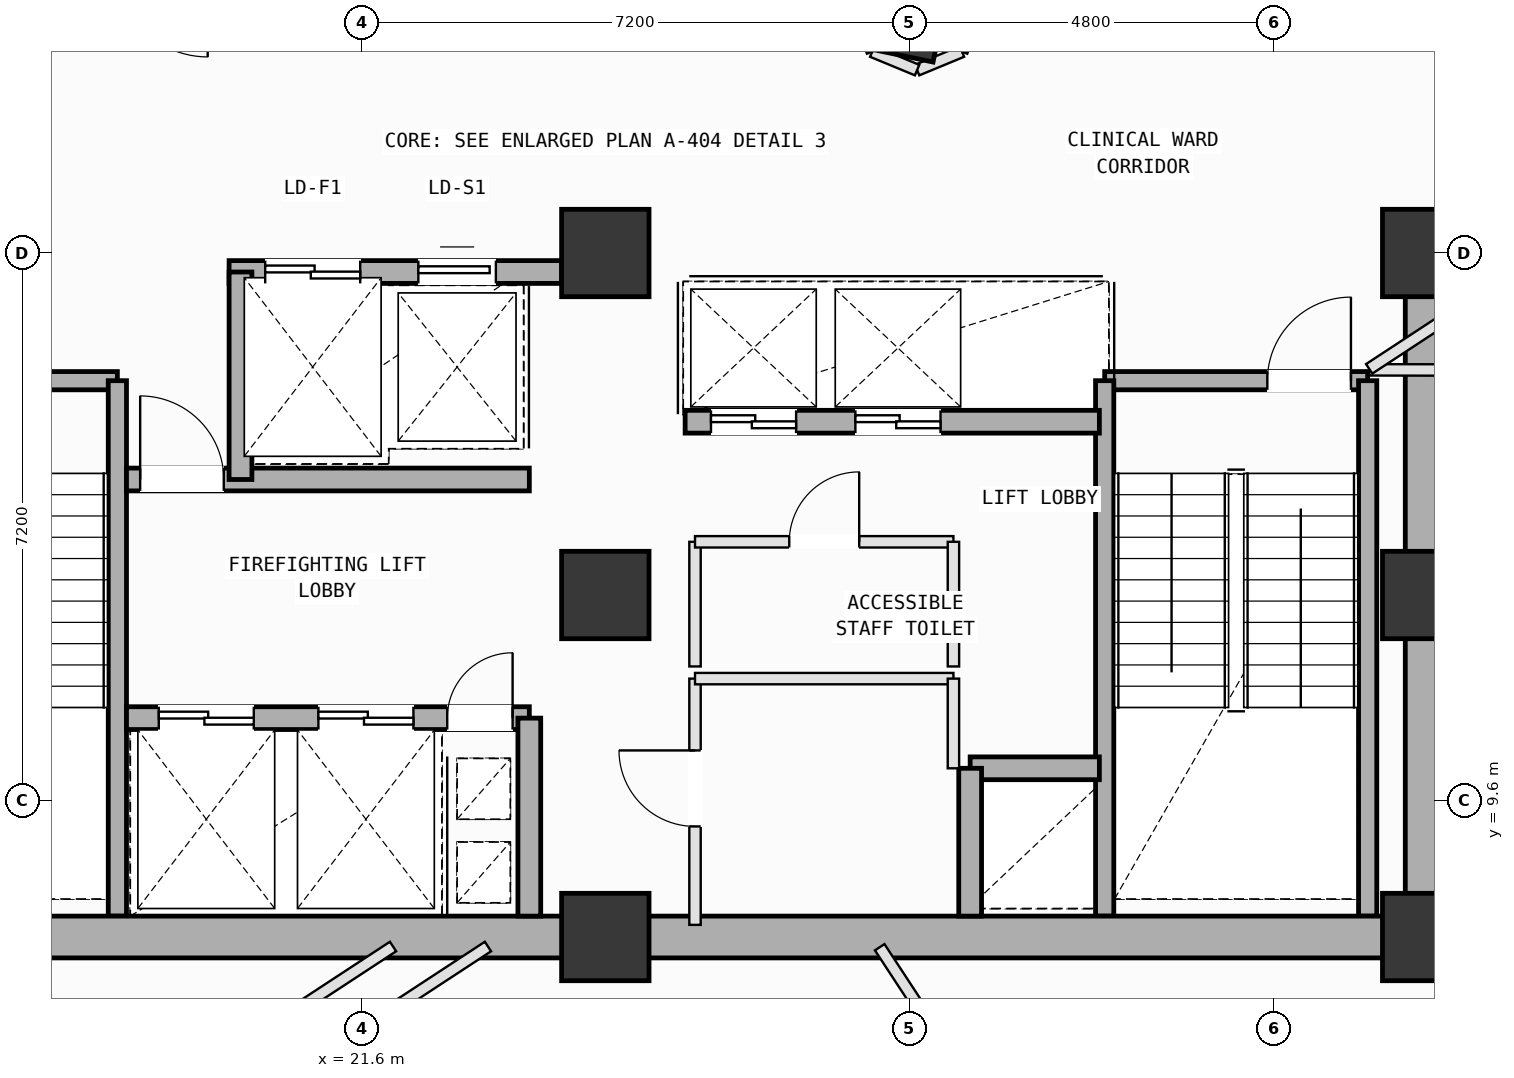
"""IFC4 building model, lengths in metres.
Left out: names, types, materials, properties, quantities, classifications, styles, units other than length and angle.
Written with IfcOpenShell. Run it as: python <this file> out.ifc"""

import sys

from ifc_helpers import new_model, si_unit, direction, frame, frame_2d, origin, origin_2d, place, context, subcontext, project, spatial, rectangle, extrude, element, fill, save


model = new_model("IFC4")
c1 = context("Model", 3, precision=1e-05, world=origin(), true_north=direction((0.0, 1.0)))
c2 = subcontext(c1, "Body", "Model", "MODEL_VIEW")
j1 = project(units=[si_unit("LENGTHUNIT", "METRE"), si_unit("PLANEANGLEUNIT", "RADIAN")], contexts=[c1])
p1 = place(None, origin())
s1 = spatial("IfcSite", under=j1, at=p1, CompositionType="ELEMENT")
p2 = place(p1, origin())
s2 = spatial("IfcBuilding", under=s1, at=p2, CompositionType="ELEMENT")
p3 = place(p2, frame((0.0, 0.0, 165.8)))
s3 = spatial("IfcBuildingStorey", under=s2, at=p3, CompositionType="ELEMENT", Elevation=165.8)
for number, where, z_axis, x_axis in (
    (1, (24.8, 7.8, 0.0), (0.0, 0.0, 1.0), (1.0, 0.0, 0.0)),
    (2, (24.8, 12.3, 0.0), (0.0, 0.0, 1.0), (1.0, 0.0, 0.0)),
    (3, (24.8, 16.8, 0.0), (0.0, 0.0, 1.0), (1.0, 0.0, 0.0)),
    (4, (35.6, 7.8, 0.0), (0.0, 0.0, 1.0), (1.0, 0.0, 0.0)),
    (5, (35.6, 12.3, 0.0), (0.0, 0.0, 1.0), (1.0, 0.0, 0.0)),
    (6, (35.6, 16.8, 0.0), (0.0, 0.0, 1.0), (1.0, 0.0, 0.0)),
):
    element("IfcColumn", number, at=place(p3, frame(where, z_axis=z_axis, x_axis=x_axis)), inside=s3, PredefinedType="COLUMN", context=c2, shape_type="SweptSolid", body=[
        extrude(rectangle(XDim=1.15, YDim=1.15, at=origin_2d()), origin(), (0.0, 0.0, 1.0), 4.0),
    ])
p4 = place(p3, frame((28.863, 20.08, 0.002), z_axis=(0.019724836791, -0.019480566367, 0.99961564531), x_axis=(-0.553225254665, 0.832589411518, 0.027142023308)))
e7 = element("IfcColumn", 7, at=p4, inside=s3, PredefinedType="COLUMN", context=c2, shape_type="SweptSolid", body=[
    extrude(rectangle(XDim=1.4, YDim=0.8, at=origin_2d()), origin(), (0.0, 0.0, 1.0), 3.998),
])
p5 = place(p3, frame((14.92, 15.12, 0.0), z_axis=(0.0, 0.0, 1.0), x_axis=(1.0, 0.0, 0.0)))
e8 = element("IfcWall", 8, at=p5, inside=s3, PredefinedType="SOLIDWALL", context=c2, shape_type="SweptSolid", body=[
    extrude(rectangle(XDim=3.46, YDim=0.24, at=frame_2d((1.73, 0.0))), origin(), (0.0, 0.0, 1.0), 3.78),
])
p6 = place(p5, frame((0.22, 0.0, 0.0)))
e9 = element("IfcOpeningElement", 9, at=p6, cuts=e8, PredefinedType="OPENING", context=c2, shape_type="SweptSolid", body=[
    extrude(rectangle(XDim=1.1, YDim=2.15, at=frame_2d((0.55, 1.075))), frame((0.0, 0.13, 0.0), z_axis=(0.0, -1.0, 0.0), x_axis=(1.0, 0.0, 0.0)), (0.0, 0.0, 1.0), 0.26),
])
p7 = place(p3, frame((18.38, 15.12, 0.0), z_axis=(0.0, 0.0, 1.0), x_axis=(0.0, -1.0, 0.0)))
e10 = element("IfcWall", 10, at=p7, inside=s3, PredefinedType="SOLIDWALL", context=c2, shape_type="SweptSolid", body=[
    extrude(rectangle(XDim=7.045, YDim=0.24, at=frame_2d((3.522, 0.0))), origin(), (0.0, 0.0, 1.0), 3.78),
])
p8 = place(p3, frame((31.37, 15.12, 0.0), z_axis=(0.0, 0.0, 1.0), x_axis=(1.0, 0.0, 0.0)))
e11 = element("IfcWall", 11, at=p8, inside=s3, PredefinedType="SOLIDWALL", context=c2, shape_type="SweptSolid", body=[
    extrude(rectangle(XDim=3.46, YDim=0.24, at=frame_2d((1.73, 0.0))), origin(), (0.0, 0.0, 1.0), 3.78),
])
p9 = place(p8, frame((2.14, 0.0, 0.0)))
e12 = element("IfcOpeningElement", 12, at=p9, cuts=e11, PredefinedType="OPENING", context=c2, shape_type="SweptSolid", body=[
    extrude(rectangle(XDim=1.1, YDim=2.15, at=frame_2d((0.55, 1.075))), frame((0.0, 0.13, 0.0), z_axis=(0.0, -1.0, 0.0), x_axis=(1.0, 0.0, 0.0)), (0.0, 0.0, 1.0), 0.26),
])
for number, where, z_axis, x_axis in (
    (13, (34.83, 15.12, 0.0), (0.0, 0.0, 1.0), (0.0, -1.0, 0.0)),
    (14, (31.37, 8.075, 0.0), (0.0, 0.0, 1.0), (0.0, 1.0, 0.0)),
):
    element("IfcWall", number, at=place(p3, frame(where, z_axis=z_axis, x_axis=x_axis)), inside=s3, PredefinedType="SOLIDWALL", context=c2, shape_type="SweptSolid", body=[
        extrude(rectangle(XDim=7.045, YDim=0.24, at=frame_2d((3.522, 0.0))), origin(), (0.0, 0.0, 1.0), 3.78),
    ])
for number, where, z_axis, x_axis in (
    (15, (14.0, 7.8, 0.0), (0.0, 0.0, 1.0), (1.0, 0.0, 0.0)),
    (16, (24.8, 7.8, 0.0), (0.0, 0.0, 1.0), (1.0, 0.0, 0.0)),
):
    element("IfcWall", number, at=place(p3, frame(where, z_axis=z_axis, x_axis=x_axis)), inside=s3, PredefinedType="SHEAR", context=c2, shape_type="SweptSolid", body=[
        extrude(rectangle(XDim=10.8, YDim=0.55, at=frame_2d((5.4, 0.0))), origin(), (0.0, 0.0, 1.0), 3.78),
    ])
p10 = place(p3, frame((35.6, 7.8, 0.0), z_axis=(0.0, 0.0, 1.0), x_axis=(0.0, 1.0, 0.0)))
e17 = element("IfcWall", 17, at=p10, inside=s3, PredefinedType="SHEAR", context=c2, shape_type="SweptSolid", body=[
    extrude(rectangle(XDim=9.0, YDim=0.55, at=frame_2d((4.5, 0.0))), origin(), (0.0, 0.0, 1.0), 3.78),
])
p11 = place(p3, frame((19.85, 16.55, 0.0), z_axis=(0.0, 0.0, 1.0), x_axis=(1.0, 0.0, 0.0)))
e18 = element("IfcWall", 18, at=p11, inside=s3, PredefinedType="SOLIDWALL", context=c2, shape_type="SweptSolid", body=[
    extrude(rectangle(XDim=4.375, YDim=0.3, at=frame_2d((2.188, 0.0))), origin(), (0.0, 0.0, 1.0), 3.78),
])
p12 = place(p11, frame((0.475, 0.0, 0.0)))
e19 = element("IfcOpeningElement", 19, at=p12, cuts=e18, PredefinedType="OPENING", context=c2, shape_type="SweptSolid", body=[
    extrude(rectangle(XDim=1.25, YDim=2.18, at=frame_2d((0.625, 1.09))), frame((0.0, 0.16, 0.0), z_axis=(0.0, -1.0, 0.0), x_axis=(1.0, 0.0, 0.0)), (0.0, 0.0, 1.0), 0.32),
])
p13 = place(p11, frame((2.49, 0.0, 0.0)))
e20 = element("IfcOpeningElement", 20, at=p13, cuts=e18, PredefinedType="OPENING", context=c2, shape_type="SweptSolid", body=[
    extrude(rectangle(XDim=1.02, YDim=2.12, at=frame_2d((0.51, 1.06))), frame((0.0, 0.16, 0.0), z_axis=(0.0, -1.0, 0.0), x_axis=(1.0, 0.0, 0.0)), (0.0, 0.0, 1.0), 0.32),
])
p14 = place(p3, frame((18.5, 10.68, 0.0), z_axis=(0.0, 0.0, 1.0), x_axis=(1.0, 0.0, 0.0)))
e21 = element("IfcWall", 21, at=p14, inside=s3, PredefinedType="SOLIDWALL", context=c2, shape_type="SweptSolid", body=[
    extrude(rectangle(XDim=5.3, YDim=0.3, at=frame_2d((2.65, 0.0))), origin(), (0.0, 0.0, 1.0), 3.78),
])
p15 = place(p14, frame((4.22, 0.0, 0.0)))
e22 = element("IfcOpeningElement", 22, at=p15, cuts=e21, PredefinedType="OPENING", context=c2, shape_type="SweptSolid", body=[
    extrude(rectangle(XDim=0.86, YDim=2.06, at=frame_2d((0.43, 1.03))), frame((0.0, 0.16, 0.0), z_axis=(0.0, -1.0, 0.0), x_axis=(1.0, 0.0, 0.0)), (0.0, 0.0, 1.0), 0.32),
])
p16 = place(p14, frame((0.425, 0.0, 0.0)))
e23 = element("IfcOpeningElement", 23, at=p16, cuts=e21, PredefinedType="OPENING", context=c2, shape_type="SweptSolid", body=[
    extrude(rectangle(XDim=1.25, YDim=2.18, at=frame_2d((0.625, 1.09))), frame((0.0, 0.16, 0.0), z_axis=(0.0, -1.0, 0.0), x_axis=(1.0, 0.0, 0.0)), (0.0, 0.0, 1.0), 0.32),
])
p17 = place(p14, frame((2.525, 0.0, 0.0)))
e24 = element("IfcOpeningElement", 24, at=p17, cuts=e21, PredefinedType="OPENING", context=c2, shape_type="SweptSolid", body=[
    extrude(rectangle(XDim=1.25, YDim=2.18, at=frame_2d((0.625, 1.09))), frame((0.0, 0.16, 0.0), z_axis=(0.0, -1.0, 0.0), x_axis=(1.0, 0.0, 0.0)), (0.0, 0.0, 1.0), 0.32),
])
p18 = place(p3, frame((18.5, 13.82, 0.0), z_axis=(0.0, 0.0, 1.0), x_axis=(1.0, 0.0, 0.0)))
e25 = element("IfcWall", 25, at=p18, inside=s3, PredefinedType="SOLIDWALL", context=c2, shape_type="SweptSolid", body=[
    extrude(rectangle(XDim=5.3, YDim=0.3, at=frame_2d((2.65, 0.0))), origin(), (0.0, 0.0, 1.0), 3.78),
])
p19 = place(p18, frame((0.18, 0.0, 0.0)))
e26 = element("IfcOpeningElement", 26, at=p19, cuts=e25, PredefinedType="OPENING", context=c2, shape_type="SweptSolid", body=[
    extrude(rectangle(XDim=1.1, YDim=2.15, at=frame_2d((0.55, 1.075))), frame((0.0, 0.16, 0.0), z_axis=(0.0, -1.0, 0.0), x_axis=(1.0, 0.0, 0.0)), (0.0, 0.0, 1.0), 0.32),
])
p20 = place(p3, frame((23.8, 8.075, 0.0), z_axis=(0.0, 0.0, 1.0), x_axis=(0.0, 1.0, 0.0)))
e27 = element("IfcWall", 27, at=p20, inside=s3, PredefinedType="SOLIDWALL", context=c2, shape_type="SweptSolid", body=[
    extrude(rectangle(XDim=2.605, YDim=0.3, at=frame_2d((1.302, 0.0))), origin(), (0.0, 0.0, 1.0), 3.78),
])
p21 = place(p3, frame((20.0, 13.82, 0.0), z_axis=(0.0, 0.0, 1.0), x_axis=(0.0, 1.0, 0.0)))
e28 = element("IfcWall", 28, at=p21, inside=s3, PredefinedType="SOLIDWALL", context=c2, shape_type="SweptSolid", body=[
    extrude(rectangle(XDim=2.73, YDim=0.3, at=frame_2d((1.365, 0.0))), origin(), (0.0, 0.0, 1.0), 3.78),
])
p22 = place(p3, frame((29.6, 10.02, 0.0), z_axis=(0.0, 0.0, 1.0), x_axis=(1.0, 0.0, 0.0)))
e29 = element("IfcWall", 29, at=p22, inside=s3, PredefinedType="SOLIDWALL", context=c2, shape_type="SweptSolid", body=[
    extrude(rectangle(XDim=1.7, YDim=0.3, at=frame_2d((0.85, 0.0))), origin(), (0.0, 0.0, 1.0), 3.78),
])
p23 = place(p3, frame((29.6, 8.075, 0.0), z_axis=(0.0, 0.0, 1.0), x_axis=(0.0, 1.0, 0.0)))
e30 = element("IfcWall", 30, at=p23, inside=s3, PredefinedType="SOLIDWALL", context=c2, shape_type="SweptSolid", body=[
    extrude(rectangle(XDim=1.945, YDim=0.3, at=frame_2d((0.973, 0.0))), origin(), (0.0, 0.0, 1.0), 3.78),
])
p24 = place(p3, frame((25.85, 14.58, 0.0), z_axis=(0.0, 0.0, 1.0), x_axis=(1.0, 0.0, 0.0)))
e31 = element("IfcWall", 31, at=p24, inside=s3, PredefinedType="SOLIDWALL", context=c2, shape_type="SweptSolid", body=[
    extrude(rectangle(XDim=5.45, YDim=0.3, at=frame_2d((2.725, 0.0))), origin(), (0.0, 0.0, 1.0), 3.78),
])
p25 = place(p24, frame((0.34, 0.0, 0.0)))
e32 = element("IfcOpeningElement", 32, at=p25, cuts=e31, PredefinedType="OPENING", context=c2, shape_type="SweptSolid", body=[
    extrude(rectangle(XDim=1.12, YDim=2.15, at=frame_2d((0.56, 1.075))), frame((0.0, 0.16, 0.0), z_axis=(0.0, -1.0, 0.0), x_axis=(1.0, 0.0, 0.0)), (0.0, 0.0, 1.0), 0.32),
])
p26 = place(p24, frame((2.24, 0.0, 0.0)))
e33 = element("IfcOpeningElement", 33, at=p26, cuts=e31, PredefinedType="OPENING", context=c2, shape_type="SweptSolid", body=[
    extrude(rectangle(XDim=1.12, YDim=2.15, at=frame_2d((0.56, 1.075))), frame((0.0, 0.16, 0.0), z_axis=(0.0, -1.0, 0.0), x_axis=(1.0, 0.0, 0.0)), (0.0, 0.0, 1.0), 0.32),
])
p27 = place(p3, frame((25.98, 7.96, 0.0), z_axis=(0.0, 0.0, 1.0), x_axis=(0.0, 1.0, 0.0)))
e34 = element("IfcWall", 34, at=p27, inside=s3, PredefinedType="PARTITIONING", context=c2, shape_type="SweptSolid", body=[
    extrude(rectangle(XDim=3.24, YDim=0.15, at=frame_2d((1.62, 0.0))), origin(), (0.0, 0.0, 1.0), 3.78),
])
p28 = place(p27, frame((1.295, 0.0, 0.0)))
e35 = element("IfcOpeningElement", 35, at=p28, cuts=e34, PredefinedType="OPENING", context=c2, shape_type="SweptSolid", body=[
    extrude(rectangle(XDim=1.0, YDim=2.12, at=frame_2d((0.5, 1.06))), frame((0.0, 0.085, 0.0), z_axis=(0.0, -1.0, 0.0), x_axis=(1.0, 0.0, 0.0)), (0.0, 0.0, 1.0), 0.17),
])
p29 = place(p3, frame((25.98, 11.2, 0.0), z_axis=(0.0, 0.0, 1.0), x_axis=(1.0, 0.0, 0.0)))
e36 = element("IfcWall", 36, at=p29, inside=s3, PredefinedType="PARTITIONING", context=c2, shape_type="SweptSolid", body=[
    extrude(rectangle(XDim=3.4, YDim=0.15, at=frame_2d((1.7, 0.0))), origin(), (0.0, 0.0, 1.0), 3.78),
])
p30 = place(p3, frame((29.38, 11.2, 0.0), z_axis=(0.0, 0.0, 1.0), x_axis=(0.0, -1.0, 0.0)))
e37 = element("IfcWall", 37, at=p30, inside=s3, PredefinedType="PARTITIONING", context=c2, shape_type="SweptSolid", body=[
    extrude(rectangle(XDim=1.18, YDim=0.15, at=frame_2d((0.59, 0.0))), origin(), (0.0, 0.0, 1.0), 3.78),
])
p31 = place(p3, frame((25.98, 11.36, 0.0), z_axis=(0.0, 0.0, 1.0), x_axis=(0.0, 1.0, 0.0)))
e38 = element("IfcWall", 38, at=p31, inside=s3, PredefinedType="PARTITIONING", context=c2, shape_type="SweptSolid", body=[
    extrude(rectangle(XDim=1.64, YDim=0.15, at=frame_2d((0.82, 0.0))), origin(), (0.0, 0.0, 1.0), 3.78),
])
p32 = place(p3, frame((25.98, 13.0, 0.0), z_axis=(0.0, 0.0, 1.0), x_axis=(1.0, 0.0, 0.0)))
e39 = element("IfcWall", 39, at=p32, inside=s3, PredefinedType="PARTITIONING", context=c2, shape_type="SweptSolid", body=[
    extrude(rectangle(XDim=3.4, YDim=0.15, at=frame_2d((1.7, 0.0))), origin(), (0.0, 0.0, 1.0), 3.78),
])
p33 = place(p32, frame((1.24, 0.0, 0.0)))
e40 = element("IfcOpeningElement", 40, at=p33, cuts=e39, PredefinedType="OPENING", context=c2, shape_type="SweptSolid", body=[
    extrude(rectangle(XDim=0.92, YDim=2.1, at=frame_2d((0.46, 1.05))), frame((0.0, 0.085, 0.0), z_axis=(0.0, -1.0, 0.0), x_axis=(1.0, 0.0, 0.0)), (0.0, 0.0, 1.0), 0.17),
])
p34 = place(p3, frame((29.38, 13.0, 0.0), z_axis=(0.0, 0.0, 1.0), x_axis=(0.0, -1.0, 0.0)))
e41 = element("IfcWall", 41, at=p34, inside=s3, PredefinedType="PARTITIONING", context=c2, shape_type="SweptSolid", body=[
    extrude(rectangle(XDim=1.64, YDim=0.15, at=frame_2d((0.82, 0.0))), origin(), (0.0, 0.0, 1.0), 3.78),
])
p35 = place(p3, frame((15.951, 2.886, 0.0), z_axis=(0.0, 0.0, 1.0), x_axis=(0.83630823453, 0.548259552454, 0.0)))
e42 = element("IfcWall", 42, at=p35, inside=s3, PredefinedType="PARTITIONING", context=c2, shape_type="SweptSolid", body=[
    extrude(rectangle(XDim=8.735, YDim=0.15, at=frame_2d((4.368, 0.0))), origin(), (0.0, 0.0, 1.0), 3.78),
])
p36 = place(p3, frame((28.41, 7.666, 0.0), z_axis=(0.0, 0.0, 1.0), x_axis=(0.548278394719, -0.836295881782, 0.0)))
e43 = element("IfcWall", 43, at=p36, inside=s3, PredefinedType="PARTITIONING", context=c2, shape_type="SweptSolid", body=[
    extrude(rectangle(XDim=10.652, YDim=0.15, at=frame_2d((5.326, 0.0))), origin(), (0.0, 0.0, 1.0), 3.78),
])
p37 = place(p36, frame((5.075, 0.0, 0.0)))
e44 = element("IfcOpeningElement", 44, at=p37, cuts=e43, PredefinedType="OPENING", context=c2, shape_type="SweptSolid", body=[
    extrude(rectangle(XDim=0.86, YDim=2.06, at=frame_2d((0.43, 1.03))), frame((0.0, 0.085, 0.0), z_axis=(0.0, -1.0, 0.0), x_axis=(1.0, 0.0, 0.0)), (0.0, 0.0, 1.0), 0.17),
])
p38 = place(p3, frame((36.15, 15.26, 0.0), z_axis=(0.0, 0.0, 1.0), x_axis=(-0.999997459877, 0.002253938677, 0.0)))
e45 = element("IfcWall", 45, at=p38, inside=s3, PredefinedType="PARTITIONING", context=c2, shape_type="SweptSolid", body=[
    extrude(rectangle(XDim=1.3, YDim=0.15, at=frame_2d((0.65, 0.0))), origin(), (0.0, 0.0, 1.0), 3.78),
])
p39 = place(p3, frame((34.85, 15.276, 0.0), z_axis=(0.0, 0.0, 1.0), x_axis=(0.836022538156, 0.548695102671, 0.0)))
e46 = element("IfcWall", 46, at=p39, inside=s3, PredefinedType="PARTITIONING", context=c2, shape_type="SweptSolid", body=[
    extrude(rectangle(XDim=1.241, YDim=0.15, at=frame_2d((0.621, 0.0))), origin(), (0.0, 0.0, 1.0), 3.78),
])
p40 = place(p3, frame((35.6, 7.5, 0.0), z_axis=(0.0, 0.0, 1.0), x_axis=(1.0, 0.0, 0.0)))
e47 = element("IfcWall", 47, at=p40, inside=s3, PredefinedType="PARTITIONING", context=c2, shape_type="SweptSolid", body=[
    extrude(rectangle(XDim=0.55, YDim=0.15, at=frame_2d((0.275, 0.0))), origin(), (0.0, 0.0, 1.0), 3.065),
])
p41 = place(p3, frame((22.007, 7.675, 0.0), z_axis=(0.0, 0.0, 1.0), x_axis=(-0.836273059924, -0.548313203603, 0.0)))
e48 = element("IfcWall", 48, at=p41, inside=s3, PredefinedType="PARTITIONING", context=c2, shape_type="SweptSolid", body=[
    extrude(rectangle(XDim=8.251, YDim=0.15, at=frame_2d((4.125, 0.0))), origin(), (0.0, 0.0, 1.0), 3.78),
])
p42 = place(p3, frame((29.736, 20.041, 0.0), z_axis=(0.0, 0.0, 1.0), x_axis=(-0.382306769343, -0.924035461503, 0.0)))
e49 = element("IfcWall", 49, at=p42, inside=s3, PredefinedType="PARTITIONING", context=c2, shape_type="SweptSolid", body=[
    extrude(rectangle(XDim=0.639, YDim=0.15, at=frame_2d((0.319, 0.0))), origin(), (0.0, 0.0, 1.0), 3.78),
])
p43 = place(p3, frame((29.492, 19.451, 0.0), z_axis=(0.0, 0.0, 1.0), x_axis=(-0.924114659462, -0.382115291723, 0.0)))
e50 = element("IfcWall", 50, at=p43, inside=s3, PredefinedType="PARTITIONING", context=c2, shape_type="SweptSolid", body=[
    extrude(rectangle(XDim=0.638, YDim=0.15, at=frame_2d((0.319, 0.0))), origin(), (0.0, 0.0, 1.0), 3.415),
])
for number, where, z_axis, x_axis in (
    (51, (28.902, 19.207, 0.0), (0.0, 0.0, 1.0), (-0.924, 0.382, 0.0)),
    (52, (28.312, 19.451, 0.0), (0.0, 0.0, 1.0), (-0.382, 0.924, 0.0)),
):
    element("IfcWall", number, at=place(p3, frame(where, z_axis=z_axis, x_axis=x_axis)), inside=s3, PredefinedType="PARTITIONING", context=c2, shape_type="SweptSolid", body=[
        extrude(rectangle(XDim=0.638, YDim=0.15, at=frame_2d((0.319, 0.0))), origin(), (0.0, 0.0, 1.0), 3.78),
    ])
p44 = place(p9, origin())
e53 = element("IfcDoor", 53, at=p44, inside=s3, OperationType="SINGLE_SWING_RIGHT", PredefinedType="DOOR", context=c2, shape_type="SweptSolid", body=[
    extrude(rectangle(XDim=1.1, YDim=2.15, at=frame_2d((0.55, 1.075))), frame((0.0, 0.025, 0.0), z_axis=(0.0, -1.0, 0.0), x_axis=(1.0, 0.0, 0.0)), (0.0, 0.0, 1.0), 0.05),
])
fill(e12, e53)
p45 = place(p15, origin())
e54 = element("IfcDoor", 54, at=p45, inside=s3, OperationType="SINGLE_SWING_RIGHT", PredefinedType="DOOR", context=c2, shape_type="SweptSolid", body=[
    extrude(rectangle(XDim=0.86, YDim=2.06, at=frame_2d((0.43, 1.03))), frame((0.0, 0.025, 0.0), z_axis=(0.0, -1.0, 0.0), x_axis=(1.0, 0.0, 0.0)), (0.0, 0.0, 1.0), 0.05),
])
fill(e22, e54)
p46 = place(p19, origin())
e55 = element("IfcDoor", 55, at=p46, inside=s3, OperationType="SINGLE_SWING_LEFT", PredefinedType="DOOR", context=c2, shape_type="SweptSolid", body=[
    extrude(rectangle(XDim=1.1, YDim=2.15, at=frame_2d((0.55, 1.075))), frame((0.0, 0.025, 0.0), z_axis=(0.0, -1.0, 0.0), x_axis=(1.0, 0.0, 0.0)), (0.0, 0.0, 1.0), 0.05),
])
fill(e26, e55)
p47 = place(p16, origin())
e56 = element("IfcDoor", 56, at=p47, inside=s3, OperationType="DOUBLE_DOOR_SLIDING", PredefinedType="DOOR", context=c2, shape_type="SweptSolid", body=[
    extrude(rectangle(XDim=1.25, YDim=2.18, at=frame_2d((0.625, 1.09))), frame((0.0, 0.025, 0.0), z_axis=(0.0, -1.0, 0.0), x_axis=(1.0, 0.0, 0.0)), (0.0, 0.0, 1.0), 0.05),
])
fill(e23, e56)
p48 = place(p17, origin())
e57 = element("IfcDoor", 57, at=p48, inside=s3, OperationType="DOUBLE_DOOR_SLIDING", PredefinedType="DOOR", context=c2, shape_type="SweptSolid", body=[
    extrude(rectangle(XDim=1.25, YDim=2.18, at=frame_2d((0.625, 1.09))), frame((0.0, 0.025, 0.0), z_axis=(0.0, -1.0, 0.0), x_axis=(1.0, 0.0, 0.0)), (0.0, 0.0, 1.0), 0.05),
])
fill(e24, e57)
p49 = place(p25, origin())
e58 = element("IfcDoor", 58, at=p49, inside=s3, OperationType="DOUBLE_DOOR_SLIDING", PredefinedType="DOOR", context=c2, shape_type="SweptSolid", body=[
    extrude(rectangle(XDim=1.12, YDim=2.15, at=frame_2d((0.56, 1.075))), frame((0.0, 0.025, 0.0), z_axis=(0.0, -1.0, 0.0), x_axis=(1.0, 0.0, 0.0)), (0.0, 0.0, 1.0), 0.05),
])
fill(e32, e58)
p50 = place(p26, origin())
e59 = element("IfcDoor", 59, at=p50, inside=s3, OperationType="DOUBLE_DOOR_SLIDING", PredefinedType="DOOR", context=c2, shape_type="SweptSolid", body=[
    extrude(rectangle(XDim=1.12, YDim=2.15, at=frame_2d((0.56, 1.075))), frame((0.0, 0.025, 0.0), z_axis=(0.0, -1.0, 0.0), x_axis=(1.0, 0.0, 0.0)), (0.0, 0.0, 1.0), 0.05),
])
fill(e33, e59)
p51 = place(p12, origin())
e60 = element("IfcDoor", 60, at=p51, inside=s3, OperationType="DOUBLE_DOOR_SLIDING", PredefinedType="DOOR", context=c2, shape_type="SweptSolid", body=[
    extrude(rectangle(XDim=1.25, YDim=2.18, at=frame_2d((0.625, 1.09))), frame((0.0, 0.025, 0.0), z_axis=(0.0, -1.0, 0.0), x_axis=(1.0, 0.0, 0.0)), (0.0, 0.0, 1.0), 0.05),
])
fill(e19, e60)
p52 = place(p13, origin())
e61 = element("IfcDoor", 61, at=p52, inside=s3, OperationType="SLIDING_TO_LEFT", PredefinedType="DOOR", context=c2, shape_type="SweptSolid", body=[
    extrude(rectangle(XDim=1.02, YDim=2.12, at=frame_2d((0.51, 1.06))), frame((0.0, 0.025, 0.0), z_axis=(0.0, -1.0, 0.0), x_axis=(1.0, 0.0, 0.0)), (0.0, 0.0, 1.0), 0.05),
])
fill(e20, e61)
p53 = place(p28, origin())
e62 = element("IfcDoor", 62, at=p53, inside=s3, OperationType="SINGLE_SWING_RIGHT", PredefinedType="DOOR", context=c2, shape_type="SweptSolid", body=[
    extrude(rectangle(XDim=1.0, YDim=2.12, at=frame_2d((0.5, 1.06))), frame((0.0, 0.025, 0.0), z_axis=(0.0, -1.0, 0.0), x_axis=(1.0, 0.0, 0.0)), (0.0, 0.0, 1.0), 0.05),
])
fill(e35, e62)
p54 = place(p33, origin())
e63 = element("IfcDoor", 63, at=p54, inside=s3, OperationType="SINGLE_SWING_RIGHT", PredefinedType="DOOR", context=c2, shape_type="SweptSolid", body=[
    extrude(rectangle(XDim=0.92, YDim=2.1, at=frame_2d((0.46, 1.05))), frame((0.0, 0.025, 0.0), z_axis=(0.0, -1.0, 0.0), x_axis=(1.0, 0.0, 0.0)), (0.0, 0.0, 1.0), 0.05),
])
fill(e40, e63)
save(model, sys.argv[1])
